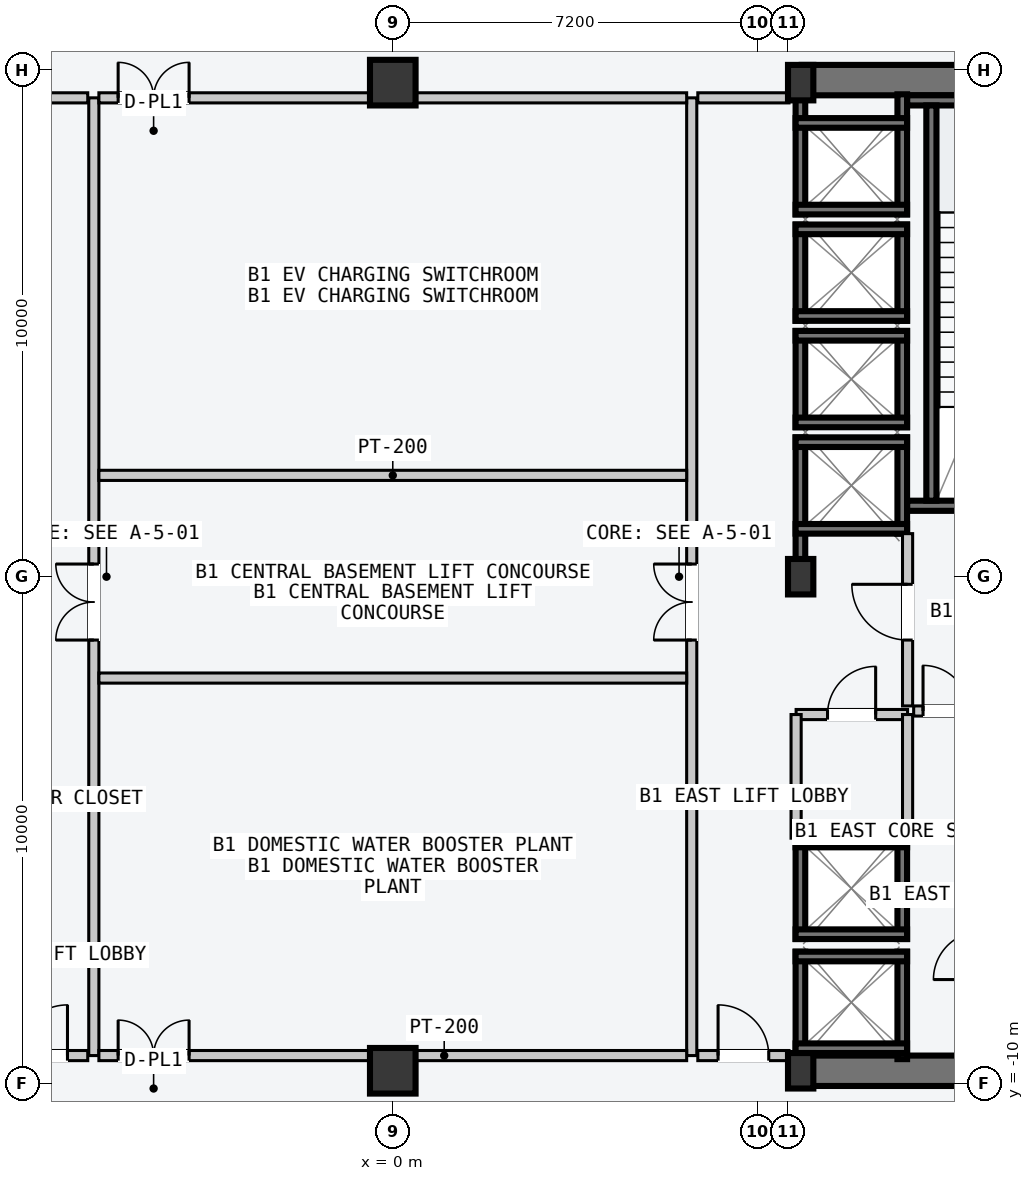
"""IFC4 building model, lengths in metres.
Left out: names, types, materials, properties, quantities, classifications, styles, units other than length and angle.
Written with IfcOpenShell. Run it as: python <this file> out.ifc"""

import sys

from ifc_helpers import new_model, si_unit, direction, frame, frame_2d, origin, origin_2d, place, context, subcontext, project, spatial, rectangle, hollow_rectangle, i_section, extrude, element, fill, save


model = new_model("IFC4")
c1 = context("Model", 3, precision=1e-05, world=origin(), true_north=direction((0.0, 1.0)))
c2 = subcontext(c1, "Body", "Model", "MODEL_VIEW")
j1 = project(units=[si_unit("LENGTHUNIT", "METRE"), si_unit("PLANEANGLEUNIT", "RADIAN")], contexts=[c1])
p1 = place(None, origin())
s1 = spatial("IfcSite", under=j1, at=p1, CompositionType="ELEMENT")
p2 = place(p1, origin())
s2 = spatial("IfcBuilding", under=s1, at=p2, CompositionType="ELEMENT")
p3 = place(p2, frame((0.0, 0.0, -4.8)))
s3 = spatial("IfcBuildingStorey", under=s2, at=p3, CompositionType="ELEMENT", Elevation=-4.8)
for number, where, z_axis, x_axis in (
    (1, (8.07, -9.75, -0.22), (0.0, 0.0, 1.0), (1.0, 0.0, 0.0)),
    (2, (8.07, 9.8, -0.22), (0.0, 0.0, 1.0), (1.0, 0.0, 0.0)),
):
    element("IfcWall", number, at=place(p3, frame(where, z_axis=z_axis, x_axis=x_axis)), inside=s3, PredefinedType="SHEAR", context=c2, shape_type="SweptSolid", body=[
        extrude(rectangle(XDim=6.46, YDim=0.6, at=frame_2d((3.23, 0.0))), origin(), (0.0, 0.0, 1.0), 4.8),
    ])
p4 = place(p3, frame((10.15, 1.4, -0.22), z_axis=(0.0, 0.0, 1.0), x_axis=(1.0, 0.0, 0.0)))
e3 = element("IfcWall", 3, at=p4, inside=s3, PredefinedType="SOLIDWALL", context=c2, shape_type="SweptSolid", body=[
    extrude(rectangle(XDim=4.1, YDim=0.2, at=frame_2d((2.05, 0.0))), origin(), (0.0, 0.0, 1.0), 4.8),
])
p5 = place(p4, frame((1.5, 0.0, 0.22)))
e4 = element("IfcOpeningElement", 4, at=p5, cuts=e3, PredefinedType="OPENING", context=c2, shape_type="SweptSolid", body=[
    extrude(rectangle(XDim=1.12, YDim=2.18, at=frame_2d((0.56, 1.09))), frame((0.0, 0.11, 0.0), z_axis=(0.0, -1.0, 0.0), x_axis=(1.0, 0.0, 0.0)), (0.0, 0.0, 1.0), 0.22),
])
p6 = place(p3, frame((10.15, 9.4, -0.22), z_axis=(0.0, 0.0, 1.0), x_axis=(1.0, 0.0, 0.0)))
e5 = element("IfcWall", 5, at=p6, inside=s3, PredefinedType="SOLIDWALL", context=c2, shape_type="SweptSolid", body=[
    extrude(rectangle(XDim=4.1, YDim=0.2, at=frame_2d((2.05, 0.0))), origin(), (0.0, 0.0, 1.0), 4.8),
])
p7 = place(p3, frame((10.63, 1.5, -0.22), z_axis=(0.0, 0.0, 1.0), x_axis=(0.0, 1.0, 0.0)))
e6 = element("IfcWall", 6, at=p7, inside=s3, PredefinedType="SOLIDWALL", context=c2, shape_type="SweptSolid", body=[
    extrude(rectangle(XDim=7.8, YDim=0.2, at=frame_2d((3.9, 0.0))), origin(), (0.0, 0.0, 1.0), 4.8),
])
for number, where, z_axis, x_axis in (
    (7, (8.05, -9.75, 0.0), (0.0, 0.0, 1.0), (1.0, 0.0, 0.0)),
    (8, (8.05, 0.0, 0.0), (0.0, 0.0, 1.0), (1.0, 0.0, 0.0)),
    (9, (8.05, 9.75, 0.0), (0.0, 0.0, 1.0), (1.0, 0.0, 0.0)),
):
    element("IfcColumn", number, at=place(p3, frame(where, z_axis=z_axis, x_axis=x_axis)), inside=s3, PredefinedType="COLUMN", context=c2, shape_type="SweptSolid", body=[
        extrude(i_section(OverallWidth=0.5, OverallDepth=0.7, WebThickness=0.028, FlangeThickness=0.045, at=origin_2d()), origin(), (0.0, 0.0, 1.0), 4.8),
    ])
for number, where, z_axis, x_axis in (
    (10, (0.0, -9.75, 0.0), (0.0, 0.0, 1.0), (1.0, 0.0, 0.0)),
    (11, (0.0, 9.75, 0.0), (0.0, 0.0, 1.0), (1.0, 0.0, 0.0)),
):
    element("IfcColumn", number, at=place(p3, frame(where, z_axis=z_axis, x_axis=x_axis)), inside=s3, PredefinedType="COLUMN", context=c2, shape_type="SweptSolid", body=[
        extrude(hollow_rectangle(XDim=0.9, YDim=0.9, WallThickness=0.045, at=origin_2d()), origin(), (0.0, 0.0, 1.0), 4.8),
    ])
p8 = place(p3, frame((8.045, 0.21, -0.22), z_axis=(0.0, 0.0, 1.0), x_axis=(0.0, 1.0, 0.0)))
e12 = element("IfcWall", 12, at=p8, inside=s3, PredefinedType="SOLIDWALL", context=c2, shape_type="SweptSolid", body=[
    extrude(rectangle(XDim=2.54, YDim=0.19, at=frame_2d((1.27, 0.0))), origin(), (0.0, 0.0, 1.0), 4.8),
])
p9 = place(p3, frame((10.055, 0.85, -0.22), z_axis=(0.0, 0.0, 1.0), x_axis=(0.0, 1.0, 0.0)))
e13 = element("IfcWall", 13, at=p9, inside=s3, PredefinedType="SOLIDWALL", context=c2, shape_type="SweptSolid", body=[
    extrude(rectangle(XDim=1.9, YDim=0.19, at=frame_2d((0.95, 0.0))), origin(), (0.0, 0.0, 1.0), 4.8),
])
for number, where, z_axis, x_axis in (
    (14, (7.95, 2.655, -0.22), (0.0, 0.0, 1.0), (1.0, 0.0, 0.0)),
    (15, (7.95, 0.945, -0.22), (0.0, 0.0, 1.0), (1.0, 0.0, 0.0)),
):
    element("IfcWall", number, at=place(p3, frame(where, z_axis=z_axis, x_axis=x_axis)), inside=s3, PredefinedType="SOLIDWALL", context=c2, shape_type="SweptSolid", body=[
        extrude(rectangle(XDim=2.2, YDim=0.19, at=frame_2d((1.1, 0.0))), origin(), (0.0, 0.0, 1.0), 4.8),
    ])
for number, where, z_axis, x_axis in (
    (16, (8.045, 2.95, -0.22), (0.0, 0.0, 1.0), (0.0, 1.0, 0.0)),
    (17, (10.055, 2.95, -0.22), (0.0, 0.0, 1.0), (0.0, 1.0, 0.0)),
):
    element("IfcWall", number, at=place(p3, frame(where, z_axis=z_axis, x_axis=x_axis)), inside=s3, PredefinedType="SOLIDWALL", context=c2, shape_type="SweptSolid", body=[
        extrude(rectangle(XDim=1.9, YDim=0.19, at=frame_2d((0.95, 0.0))), origin(), (0.0, 0.0, 1.0), 4.8),
    ])
for number, where, z_axis, x_axis in (
    (18, (7.95, 4.755, -0.22), (0.0, 0.0, 1.0), (1.0, 0.0, 0.0)),
    (19, (7.95, 3.045, -0.22), (0.0, 0.0, 1.0), (1.0, 0.0, 0.0)),
):
    element("IfcWall", number, at=place(p3, frame(where, z_axis=z_axis, x_axis=x_axis)), inside=s3, PredefinedType="SOLIDWALL", context=c2, shape_type="SweptSolid", body=[
        extrude(rectangle(XDim=2.2, YDim=0.19, at=frame_2d((1.1, 0.0))), origin(), (0.0, 0.0, 1.0), 4.8),
    ])
for number, where, z_axis, x_axis in (
    (20, (8.045, 5.05, -0.22), (0.0, 0.0, 1.0), (0.0, 1.0, 0.0)),
    (21, (10.055, 5.05, -0.22), (0.0, 0.0, 1.0), (0.0, 1.0, 0.0)),
):
    element("IfcWall", number, at=place(p3, frame(where, z_axis=z_axis, x_axis=x_axis)), inside=s3, PredefinedType="SOLIDWALL", context=c2, shape_type="SweptSolid", body=[
        extrude(rectangle(XDim=1.9, YDim=0.19, at=frame_2d((0.95, 0.0))), origin(), (0.0, 0.0, 1.0), 4.8),
    ])
for number, where, z_axis, x_axis in (
    (22, (7.95, 6.855, -0.22), (0.0, 0.0, 1.0), (1.0, 0.0, 0.0)),
    (23, (7.95, 5.145, -0.22), (0.0, 0.0, 1.0), (1.0, 0.0, 0.0)),
):
    element("IfcWall", number, at=place(p3, frame(where, z_axis=z_axis, x_axis=x_axis)), inside=s3, PredefinedType="SOLIDWALL", context=c2, shape_type="SweptSolid", body=[
        extrude(rectangle(XDim=2.2, YDim=0.19, at=frame_2d((1.1, 0.0))), origin(), (0.0, 0.0, 1.0), 4.8),
    ])
for number, where, z_axis, x_axis in (
    (24, (8.045, 7.15, -0.22), (0.0, 0.0, 1.0), (0.0, 1.0, 0.0)),
    (25, (10.055, 7.15, -0.22), (0.0, 0.0, 1.0), (0.0, 1.0, 0.0)),
):
    element("IfcWall", number, at=place(p3, frame(where, z_axis=z_axis, x_axis=x_axis)), inside=s3, PredefinedType="SOLIDWALL", context=c2, shape_type="SweptSolid", body=[
        extrude(rectangle(XDim=2.37, YDim=0.19, at=frame_2d((1.185, 0.0))), origin(), (0.0, 0.0, 1.0), 4.8),
    ])
for number, where, z_axis, x_axis in (
    (26, (7.95, 8.955, -0.22), (0.0, 0.0, 1.0), (1.0, 0.0, 0.0)),
    (27, (7.95, 7.245, -0.22), (0.0, 0.0, 1.0), (1.0, 0.0, 0.0)),
):
    element("IfcWall", number, at=place(p3, frame(where, z_axis=z_axis, x_axis=x_axis)), inside=s3, PredefinedType="SOLIDWALL", context=c2, shape_type="SweptSolid", body=[
        extrude(rectangle(XDim=2.2, YDim=0.19, at=frame_2d((1.1, 0.0))), origin(), (0.0, 0.0, 1.0), 4.8),
    ])
for number, where, z_axis, x_axis in (
    (28, (8.045, -9.52, -0.22), (0.0, 0.0, 1.0), (0.0, 1.0, 0.0)),
    (29, (10.055, -9.52, -0.22), (0.0, 0.0, 1.0), (0.0, 1.0, 0.0)),
):
    element("IfcWall", number, at=place(p3, frame(where, z_axis=z_axis, x_axis=x_axis)), inside=s3, PredefinedType="SOLIDWALL", context=c2, shape_type="SweptSolid", body=[
        extrude(rectangle(XDim=2.12, YDim=0.19, at=frame_2d((1.06, 0.0))), origin(), (0.0, 0.0, 1.0), 4.8),
    ])
for number, where, z_axis, x_axis in (
    (30, (7.95, -7.495, -0.22), (0.0, 0.0, 1.0), (1.0, 0.0, 0.0)),
    (31, (7.95, -9.305, -0.22), (0.0, 0.0, 1.0), (1.0, 0.0, 0.0)),
):
    element("IfcWall", number, at=place(p3, frame(where, z_axis=z_axis, x_axis=x_axis)), inside=s3, PredefinedType="SOLIDWALL", context=c2, shape_type="SweptSolid", body=[
        extrude(rectangle(XDim=2.2, YDim=0.19, at=frame_2d((1.1, 0.0))), origin(), (0.0, 0.0, 1.0), 4.8),
    ])
for number, where, z_axis, x_axis in (
    (32, (8.045, -7.15, -0.22), (0.0, 0.0, 1.0), (0.0, 1.0, 0.0)),
    (33, (10.055, -7.15, -0.22), (0.0, 0.0, 1.0), (0.0, 1.0, 0.0)),
):
    element("IfcWall", number, at=place(p3, frame(where, z_axis=z_axis, x_axis=x_axis)), inside=s3, PredefinedType="SOLIDWALL", context=c2, shape_type="SweptSolid", body=[
        extrude(rectangle(XDim=2.0, YDim=0.19, at=frame_2d((1.0, 0.0))), origin(), (0.0, 0.0, 1.0), 4.8),
    ])
for number, where, z_axis, x_axis in (
    (34, (7.95, -5.245, -0.22), (0.0, 0.0, 1.0), (1.0, 0.0, 0.0)),
    (35, (7.95, -7.055, -0.22), (0.0, 0.0, 1.0), (1.0, 0.0, 0.0)),
):
    element("IfcWall", number, at=place(p3, frame(where, z_axis=z_axis, x_axis=x_axis)), inside=s3, PredefinedType="SOLIDWALL", context=c2, shape_type="SweptSolid", body=[
        extrude(rectangle(XDim=2.2, YDim=0.19, at=frame_2d((1.1, 0.0))), origin(), (0.0, 0.0, 1.0), 4.8),
    ])
p10 = place(p3, frame((-5.9, -9.45, 0.0), z_axis=(0.0, 0.0, 1.0), x_axis=(0.0, 1.0, 0.0)))
e36 = element("IfcWall", 36, at=p10, inside=s3, PredefinedType="PARTITIONING", context=c2, shape_type="SweptSolid", body=[
    extrude(rectangle(XDim=18.9, YDim=0.2, at=frame_2d((9.45, 0.0))), origin(), (0.0, 0.0, 1.0), 4.58),
])
p11 = place(p10, frame((8.2, 0.0, 0.0)))
e37 = element("IfcOpeningElement", 37, at=p11, cuts=e36, PredefinedType="OPENING", context=c2, shape_type="SweptSolid", body=[
    extrude(rectangle(XDim=1.5, YDim=2.2, at=frame_2d((0.75, 1.1))), frame((0.0, 0.11, 0.0), z_axis=(0.0, -1.0, 0.0), x_axis=(1.0, 0.0, 0.0)), (0.0, 0.0, 1.0), 0.22),
])
p12 = place(p3, frame((-6.02, 9.45, 0.0), z_axis=(0.0, 0.0, 1.0), x_axis=(-1.0, 0.0, 0.0)))
e38 = element("IfcWall", 38, at=p12, inside=s3, PredefinedType="PARTITIONING", context=c2, shape_type="SweptSolid", body=[
    extrude(rectangle(XDim=1.8, YDim=0.2, at=frame_2d((0.9, 0.0))), origin(), (0.0, 0.0, 1.0), 4.58),
])
p13 = place(p3, frame((5.9, -9.45, 0.0), z_axis=(0.0, 0.0, 1.0), x_axis=(0.0, 1.0, 0.0)))
e39 = element("IfcWall", 39, at=p13, inside=s3, PredefinedType="PARTITIONING", context=c2, shape_type="SweptSolid", body=[
    extrude(rectangle(XDim=18.9, YDim=0.2, at=frame_2d((9.45, 0.0))), origin(), (0.0, 0.0, 1.0), 4.58),
])
p14 = place(p13, frame((8.2, 0.0, 0.0)))
e40 = element("IfcOpeningElement", 40, at=p14, cuts=e39, PredefinedType="OPENING", context=c2, shape_type="SweptSolid", body=[
    extrude(rectangle(XDim=1.5, YDim=2.2, at=frame_2d((0.75, 1.1))), frame((0.0, 0.11, 0.0), z_axis=(0.0, -1.0, 0.0), x_axis=(1.0, 0.0, 0.0)), (0.0, 0.0, 1.0), 0.22),
])
p15 = place(p3, frame((6.02, 9.45, 0.0), z_axis=(0.0, 0.0, 1.0), x_axis=(1.0, 0.0, 0.0)))
e41 = element("IfcWall", 41, at=p15, inside=s3, PredefinedType="PARTITIONING", context=c2, shape_type="SweptSolid", body=[
    extrude(rectangle(XDim=1.8, YDim=0.2, at=frame_2d((0.9, 0.0))), origin(), (0.0, 0.0, 1.0), 4.58),
])
p16 = place(p3, frame((10.16, -2.55, 0.0), z_axis=(0.0, 0.0, 1.0), x_axis=(0.0, 1.0, 0.0)))
e42 = element("IfcWall", 42, at=p16, inside=s3, PredefinedType="PARTITIONING", context=c2, shape_type="SweptSolid", body=[
    extrude(rectangle(XDim=3.4, YDim=0.2, at=frame_2d((1.7, 0.0))), origin(), (0.0, 0.0, 1.0), 4.58),
])
p17 = place(p16, frame((1.3, 0.0, 0.0)))
e43 = element("IfcOpeningElement", 43, at=p17, cuts=e42, PredefinedType="OPENING", context=c2, shape_type="SweptSolid", body=[
    extrude(rectangle(XDim=1.1, YDim=2.15, at=frame_2d((0.55, 1.075))), frame((0.0, 0.11, 0.0), z_axis=(0.0, -1.0, 0.0), x_axis=(1.0, 0.0, 0.0)), (0.0, 0.0, 1.0), 0.22),
])
p18 = place(p3, frame((10.28, -2.65, 0.0), z_axis=(0.0, 0.0, 1.0), x_axis=(1.0, 0.0, 0.0)))
e44 = element("IfcWall", 44, at=p18, inside=s3, PredefinedType="PARTITIONING", context=c2, shape_type="SweptSolid", body=[
    extrude(rectangle(XDim=1.27, YDim=0.2, at=frame_2d((0.635, 0.0))), origin(), (0.0, 0.0, 1.0), 4.58),
])
p19 = place(p18, frame((0.185, 0.0, 0.0)))
e45 = element("IfcOpeningElement", 45, at=p19, cuts=e44, PredefinedType="OPENING", context=c2, shape_type="SweptSolid", body=[
    extrude(rectangle(XDim=0.9, YDim=2.15, at=frame_2d((0.45, 1.075))), frame((0.0, 0.11, 0.0), z_axis=(0.0, -1.0, 0.0), x_axis=(1.0, 0.0, 0.0)), (0.0, 0.0, 1.0), 0.22),
])
p20 = place(p3, frame((7.96, -2.72, 0.0), z_axis=(0.0, 0.0, 1.0), x_axis=(1.0, 0.0, 0.0)))
e46 = element("IfcWall", 46, at=p20, inside=s3, PredefinedType="PARTITIONING", context=c2, shape_type="SweptSolid", body=[
    extrude(rectangle(XDim=2.2, YDim=0.2, at=frame_2d((1.1, 0.0))), origin(), (0.0, 0.0, 1.0), 4.58),
])
p21 = place(p20, frame((0.62, 0.0, 0.0)))
e47 = element("IfcOpeningElement", 47, at=p21, cuts=e46, PredefinedType="OPENING", context=c2, shape_type="SweptSolid", body=[
    extrude(rectangle(XDim=0.95, YDim=2.1, at=frame_2d((0.475, 1.05))), frame((0.0, 0.11, 0.0), z_axis=(0.0, -1.0, 0.0), x_axis=(1.0, 0.0, 0.0)), (0.0, 0.0, 1.0), 0.22),
])
for number, where, z_axis, x_axis in (
    (48, (7.96, -5.16, 0.0), (0.0, 0.0, 1.0), (0.0, 1.0, 0.0)),
    (49, (10.16, -5.16, 0.0), (0.0, 0.0, 1.0), (0.0, 1.0, 0.0)),
):
    element("IfcWall", number, at=place(p3, frame(where, z_axis=z_axis, x_axis=x_axis)), inside=s3, PredefinedType="PARTITIONING", context=c2, shape_type="SweptSolid", body=[
        extrude(rectangle(XDim=2.44, YDim=0.2, at=frame_2d((1.22, 0.0))), origin(), (0.0, 0.0, 1.0), 4.58),
    ])
p22 = place(p3, frame((-7.82, -9.45, 0.0), z_axis=(0.0, 0.0, 1.0), x_axis=(1.0, 0.0, 0.0)))
e50 = element("IfcWall", 50, at=p22, inside=s3, PredefinedType="PARTITIONING", context=c2, shape_type="SweptSolid", body=[
    extrude(rectangle(XDim=1.8, YDim=0.2, at=frame_2d((0.9, 0.0))), origin(), (0.0, 0.0, 1.0), 4.58),
])
p23 = place(p22, frame((0.4, 0.0, 0.0)))
e51 = element("IfcOpeningElement", 51, at=p23, cuts=e50, PredefinedType="OPENING", context=c2, shape_type="SweptSolid", body=[
    extrude(rectangle(XDim=1.0, YDim=2.15, at=frame_2d((0.5, 1.075))), frame((0.0, 0.11, 0.0), z_axis=(0.0, -1.0, 0.0), x_axis=(1.0, 0.0, 0.0)), (0.0, 0.0, 1.0), 0.22),
])
p24 = place(p3, frame((6.02, -9.45, 0.0), z_axis=(0.0, 0.0, 1.0), x_axis=(1.0, 0.0, 0.0)))
e52 = element("IfcWall", 52, at=p24, inside=s3, PredefinedType="PARTITIONING", context=c2, shape_type="SweptSolid", body=[
    extrude(rectangle(XDim=1.8, YDim=0.2, at=frame_2d((0.9, 0.0))), origin(), (0.0, 0.0, 1.0), 4.58),
])
p25 = place(p24, frame((0.4, 0.0, 0.0)))
e53 = element("IfcOpeningElement", 53, at=p25, cuts=e52, PredefinedType="OPENING", context=c2, shape_type="SweptSolid", body=[
    extrude(rectangle(XDim=1.0, YDim=2.15, at=frame_2d((0.5, 1.075))), frame((0.0, 0.11, 0.0), z_axis=(0.0, -1.0, 0.0), x_axis=(1.0, 0.0, 0.0)), (0.0, 0.0, 1.0), 0.22),
])
p26 = place(p3, frame((-5.8, -9.45, 0.0), z_axis=(0.0, 0.0, 1.0), x_axis=(1.0, 0.0, 0.0)))
e54 = element("IfcWall", 54, at=p26, inside=s3, PredefinedType="PARTITIONING", context=c2, shape_type="SweptSolid", body=[
    extrude(rectangle(XDim=11.6, YDim=0.2, at=frame_2d((5.8, 0.0))), origin(), (0.0, 0.0, 1.0), 4.58),
])
p27 = place(p26, frame((0.38, 0.0, 0.0)))
e55 = element("IfcOpeningElement", 55, at=p27, cuts=e54, PredefinedType="OPENING", context=c2, shape_type="SweptSolid", body=[
    extrude(rectangle(XDim=1.4, YDim=2.25, at=frame_2d((0.7, 1.125))), frame((0.0, 0.11, 0.0), z_axis=(0.0, -1.0, 0.0), x_axis=(1.0, 0.0, 0.0)), (0.0, 0.0, 1.0), 0.22),
])
for number, where, z_axis, x_axis in (
    (56, (-5.8, -2.0, 0.0), (0.0, 0.0, 1.0), (1.0, 0.0, 0.0)),
    (57, (-5.8, 2.0, 0.0), (0.0, 0.0, 1.0), (1.0, 0.0, 0.0)),
):
    element("IfcWall", number, at=place(p3, frame(where, z_axis=z_axis, x_axis=x_axis)), inside=s3, PredefinedType="PARTITIONING", context=c2, shape_type="SweptSolid", body=[
        extrude(rectangle(XDim=11.6, YDim=0.2, at=frame_2d((5.8, 0.0))), origin(), (0.0, 0.0, 1.0), 4.58),
    ])
p28 = place(p3, frame((-5.8, 9.45, 0.0), z_axis=(0.0, 0.0, 1.0), x_axis=(1.0, 0.0, 0.0)))
e58 = element("IfcWall", 58, at=p28, inside=s3, PredefinedType="PARTITIONING", context=c2, shape_type="SweptSolid", body=[
    extrude(rectangle(XDim=11.6, YDim=0.2, at=frame_2d((5.8, 0.0))), origin(), (0.0, 0.0, 1.0), 4.58),
])
p29 = place(p28, frame((0.38, 0.0, 0.0)))
e59 = element("IfcOpeningElement", 59, at=p29, cuts=e58, PredefinedType="OPENING", context=c2, shape_type="SweptSolid", body=[
    extrude(rectangle(XDim=1.4, YDim=2.25, at=frame_2d((0.7, 1.125))), frame((0.0, 0.11, 0.0), z_axis=(0.0, -1.0, 0.0), x_axis=(1.0, 0.0, 0.0)), (0.0, 0.0, 1.0), 0.22),
])
p30 = place(p11, origin())
e60 = element("IfcDoor", 60, at=p30, inside=s3, OperationType="DOUBLE_DOOR_SINGLE_SWING", PredefinedType="DOOR", context=c2, shape_type="SweptSolid", body=[
    extrude(rectangle(XDim=1.5, YDim=2.2, at=frame_2d((0.75, 1.1))), frame((0.0, 0.025, 0.0), z_axis=(0.0, -1.0, 0.0), x_axis=(1.0, 0.0, 0.0)), (0.0, 0.0, 1.0), 0.05),
])
fill(e37, e60)
p31 = place(p14, origin())
e61 = element("IfcDoor", 61, at=p31, inside=s3, OperationType="DOUBLE_DOOR_SINGLE_SWING", PredefinedType="DOOR", context=c2, shape_type="SweptSolid", body=[
    extrude(rectangle(XDim=1.5, YDim=2.2, at=frame_2d((0.75, 1.1))), frame((0.0, 0.025, 0.0), z_axis=(0.0, -1.0, 0.0), x_axis=(1.0, 0.0, 0.0)), (0.0, 0.0, 1.0), 0.05),
])
fill(e40, e61)
p32 = place(p17, origin())
e62 = element("IfcDoor", 62, at=p32, inside=s3, OperationType="SINGLE_SWING_RIGHT", PredefinedType="DOOR", context=c2, shape_type="SweptSolid", body=[
    extrude(rectangle(XDim=1.1, YDim=2.15, at=frame_2d((0.55, 1.075))), frame((0.0, 0.025, 0.0), z_axis=(0.0, -1.0, 0.0), x_axis=(1.0, 0.0, 0.0)), (0.0, 0.0, 1.0), 0.05),
])
fill(e43, e62)
p33 = place(p19, origin())
e63 = element("IfcDoor", 63, at=p33, inside=s3, OperationType="SINGLE_SWING_LEFT", PredefinedType="DOOR", context=c2, shape_type="SweptSolid", body=[
    extrude(rectangle(XDim=0.9, YDim=2.15, at=frame_2d((0.45, 1.075))), frame((0.0, 0.025, 0.0), z_axis=(0.0, -1.0, 0.0), x_axis=(1.0, 0.0, 0.0)), (0.0, 0.0, 1.0), 0.05),
])
fill(e45, e63)
p34 = place(p21, origin())
e64 = element("IfcDoor", 64, at=p34, inside=s3, OperationType="SINGLE_SWING_RIGHT", PredefinedType="DOOR", context=c2, shape_type="SweptSolid", body=[
    extrude(rectangle(XDim=0.95, YDim=2.1, at=frame_2d((0.475, 1.05))), frame((0.0, 0.025, 0.0), z_axis=(0.0, -1.0, 0.0), x_axis=(1.0, 0.0, 0.0)), (0.0, 0.0, 1.0), 0.05),
])
fill(e47, e64)
p35 = place(p23, origin())
e65 = element("IfcDoor", 65, at=p35, inside=s3, OperationType="SINGLE_SWING_RIGHT", PredefinedType="DOOR", context=c2, shape_type="SweptSolid", body=[
    extrude(rectangle(XDim=1.0, YDim=2.15, at=frame_2d((0.5, 1.075))), frame((0.0, 0.025, 0.0), z_axis=(0.0, -1.0, 0.0), x_axis=(1.0, 0.0, 0.0)), (0.0, 0.0, 1.0), 0.05),
])
fill(e51, e65)
p36 = place(p25, origin())
e66 = element("IfcDoor", 66, at=p36, inside=s3, OperationType="SINGLE_SWING_LEFT", PredefinedType="DOOR", context=c2, shape_type="SweptSolid", body=[
    extrude(rectangle(XDim=1.0, YDim=2.15, at=frame_2d((0.5, 1.075))), frame((0.0, 0.025, 0.0), z_axis=(0.0, -1.0, 0.0), x_axis=(1.0, 0.0, 0.0)), (0.0, 0.0, 1.0), 0.05),
])
fill(e53, e66)
p37 = place(p27, origin())
e67 = element("IfcDoor", 67, at=p37, inside=s3, OperationType="DOUBLE_DOOR_SINGLE_SWING", PredefinedType="DOOR", context=c2, shape_type="SweptSolid", body=[
    extrude(rectangle(XDim=1.4, YDim=2.25, at=frame_2d((0.7, 1.125))), frame((0.0, 0.025, 0.0), z_axis=(0.0, -1.0, 0.0), x_axis=(1.0, 0.0, 0.0)), (0.0, 0.0, 1.0), 0.05),
])
fill(e55, e67)
p38 = place(p29, origin())
e68 = element("IfcDoor", 68, at=p38, inside=s3, OperationType="DOUBLE_DOOR_SINGLE_SWING", PredefinedType="DOOR", context=c2, shape_type="SweptSolid", body=[
    extrude(rectangle(XDim=1.4, YDim=2.25, at=frame_2d((0.7, 1.125))), frame((0.0, 0.025, 0.0), z_axis=(0.0, -1.0, 0.0), x_axis=(1.0, 0.0, 0.0)), (0.0, 0.0, 1.0), 0.05),
])
fill(e59, e68)
save(model, sys.argv[1])
